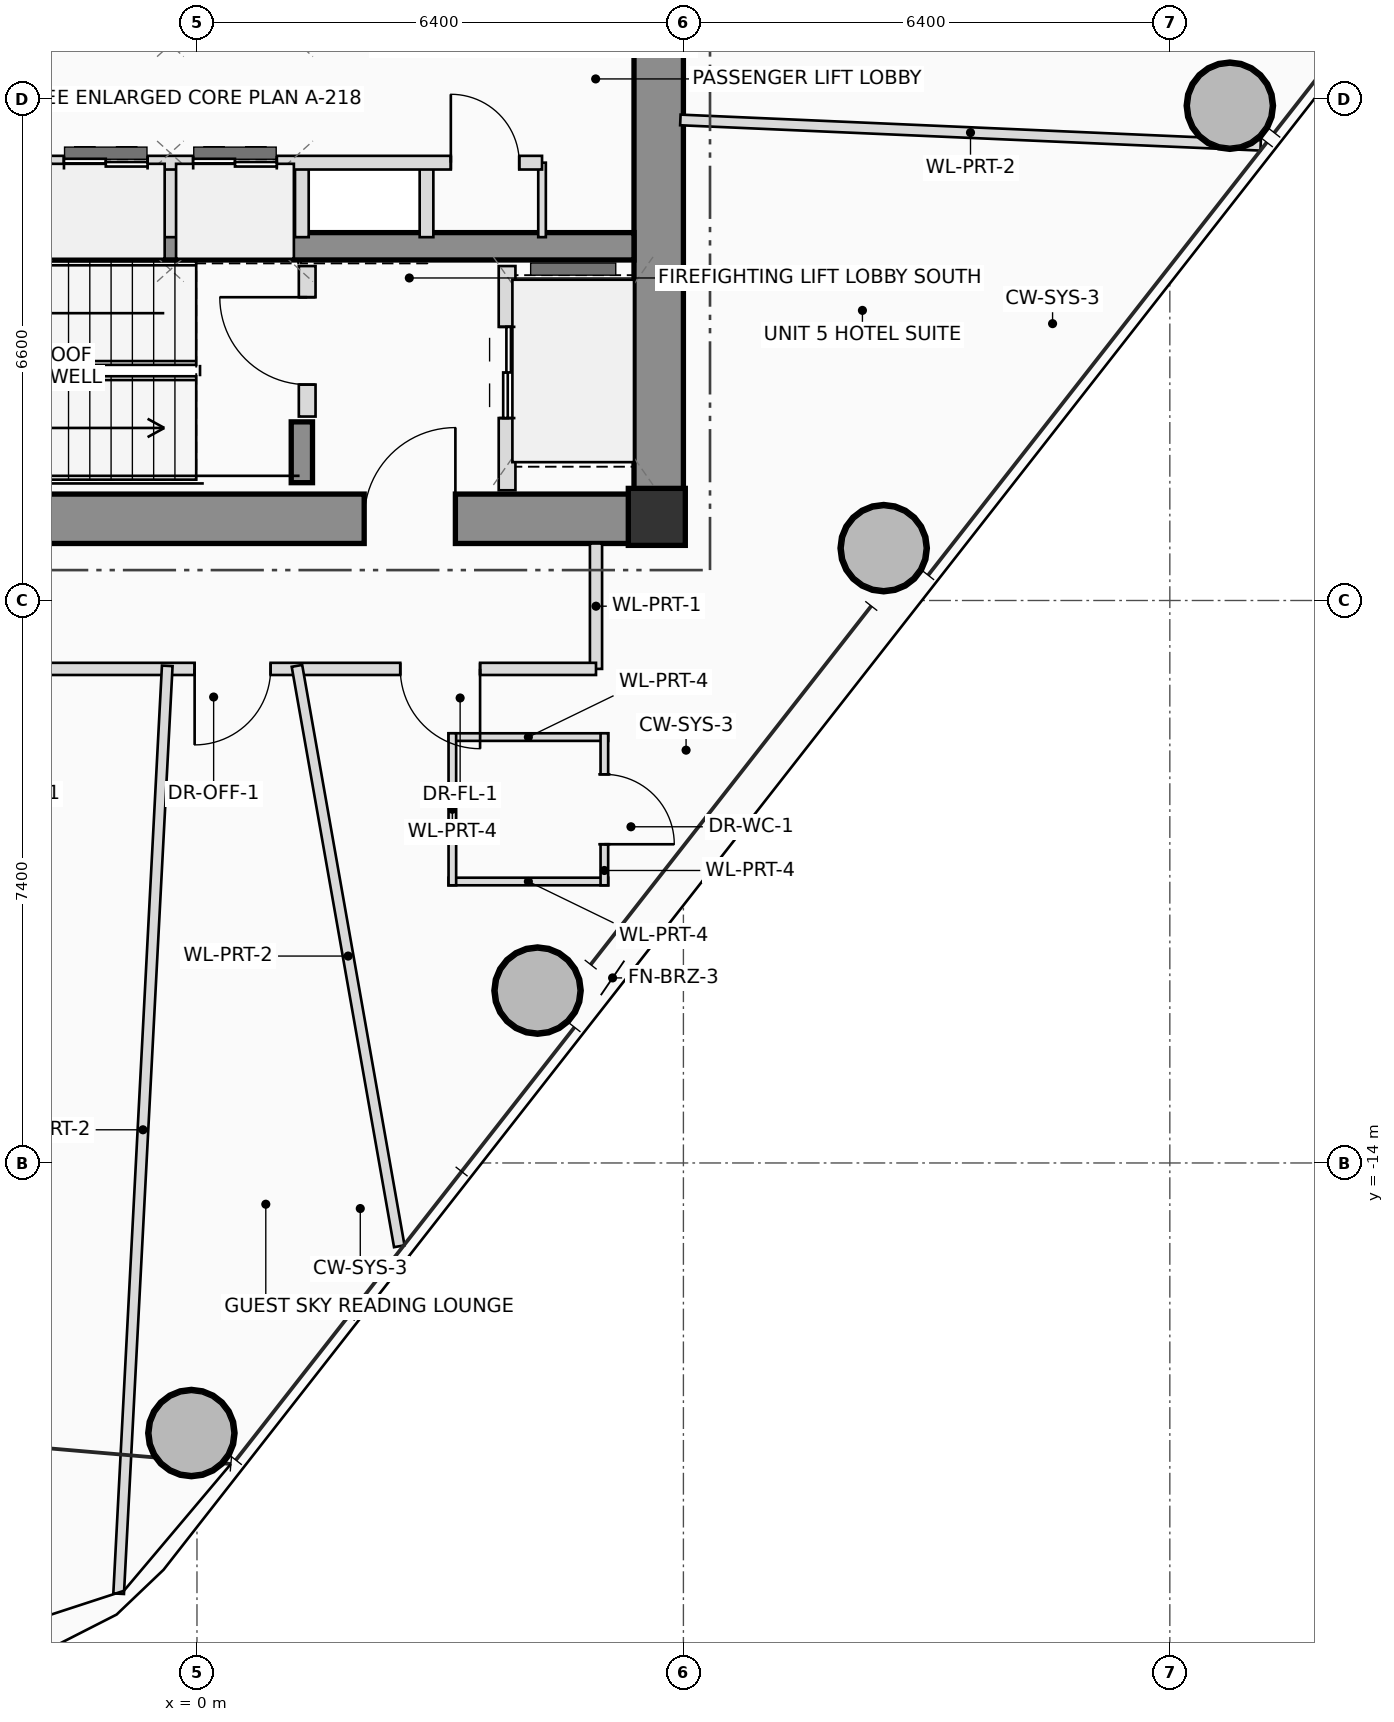
"""IFC4 building model, lengths in metres.
Left out: names, types, materials, properties, quantities, classifications, styles, units other than length and angle.
Written with IfcOpenShell. Run it as: python <this file> out.ifc"""

import sys

from ifc_helpers import new_model, si_unit, direction, frame, frame_2d, origin, origin_2d, place, context, subcontext, project, spatial, rectangle, hollow_circle, extrude, source, transform, mapped, element, fill, save


model = new_model("IFC4")
c1 = context("Model", 3, precision=1e-05, world=origin(), true_north=direction((0.0, 1.0)))
c2 = subcontext(c1, "Body", "Model", "MODEL_VIEW")
j1 = project(units=[si_unit("LENGTHUNIT", "METRE"), si_unit("PLANEANGLEUNIT", "RADIAN")], contexts=[c1])
p1 = place(None, origin())
s1 = spatial("IfcSite", under=j1, at=p1, CompositionType="ELEMENT")
p2 = place(p1, origin())
s2 = spatial("IfcBuilding", under=s1, at=p2, CompositionType="ELEMENT")
p3 = place(p2, frame((0.0, 0.0, 194.9)))
s3 = spatial("IfcBuildingStorey", under=s2, at=p3, CompositionType="ELEMENT", Elevation=194.9)
m1 = source(origin(), c2, "Body", "SweptSolid", [
    extrude(rectangle(XDim=0.75, YDim=0.75, at=origin_2d()), origin(), (0.0, 0.0, 1.0), 3.45),
])
p4 = place(p3, frame((6.05, -5.5, 0.0), z_axis=(0.0, 0.0, 1.0), x_axis=(1.0, 0.0, 0.0)))
e1 = element("IfcColumn", 1, at=p4, inside=s3, PredefinedType="COLUMN", context=c2, shape_type="MappedRepresentation", body=[
    mapped(m1, transform((0.0, 0.0, 0.0), scale=1.0)),
])
p5 = place(p3, frame((-6.4, -5.525, 0.0), z_axis=(0.0, 0.0, 1.0), x_axis=(1.0, 0.0, 0.0)))
e2 = element("IfcWall", 2, at=p5, inside=s3, PredefinedType="SHEAR", context=c2, shape_type="SweptSolid", body=[
    extrude(rectangle(XDim=12.8, YDim=0.65, at=frame_2d((6.4, 0.0))), origin(), (0.0, 0.0, 1.0), 3.45),
])
p6 = place(p5, frame((8.6, 0.0, 0.0)))
e3 = element("IfcOpeningElement", 3, at=p6, cuts=e2, PredefinedType="OPENING", context=c2, shape_type="SweptSolid", body=[
    extrude(rectangle(XDim=1.2, YDim=2.2, at=frame_2d((0.6, 1.1))), frame((0.0, 0.335, 0.0), z_axis=(0.0, -1.0, 0.0), x_axis=(1.0, 0.0, 0.0)), (0.0, 0.0, 1.0), 0.67),
])
p7 = place(p3, frame((6.075, -5.2, 0.0), z_axis=(0.0, 0.0, 1.0), x_axis=(0.0, 1.0, 0.0)))
e4 = element("IfcWall", 4, at=p7, inside=s3, PredefinedType="SHEAR", context=c2, shape_type="SweptSolid", body=[
    extrude(rectangle(XDim=10.4, YDim=0.65, at=frame_2d((5.2, 0.0))), origin(), (0.0, 0.0, 1.0), 3.45),
])
p8 = place(p3, frame((-5.75, -1.94, 0.0), z_axis=(0.0, 0.0, 1.0), x_axis=(1.0, 0.0, 0.0)))
e5 = element("IfcWall", 5, at=p8, inside=s3, PredefinedType="SHEAR", context=c2, shape_type="SweptSolid", body=[
    extrude(rectangle(XDim=11.5, YDim=0.36, at=frame_2d((5.75, 0.0))), origin(), (0.0, 0.0, 1.0), 3.45),
])
p9 = place(p3, frame((1.38, -5.05, 0.0), z_axis=(0.0, 0.0, 1.0), x_axis=(0.0, 1.0, 0.0)))
e6 = element("IfcWall", 6, at=p9, inside=s3, PredefinedType="SHEAR", context=c2, shape_type="SweptSolid", body=[
    extrude(rectangle(XDim=0.8, YDim=0.28, at=frame_2d((0.4, 0.0))), origin(), (0.0, 0.0, 1.0), 3.45),
])
m2 = source(origin(), c2, "Body", "SweptSolid", [
    extrude(hollow_circle(Radius=0.575, WallThickness=0.042, at=origin_2d()), origin(), (0.0, 0.0, 1.0), 3.45),
])
for number, where, z_axis, x_axis in (
    (7, (-0.073, -17.553, 0.0), (0.0, 0.0, 1.0), (1.0, 0.0, 0.0)),
    (8, (4.481, -11.732, 0.0), (0.0, 0.0, 1.0), (1.0, 0.0, 0.0)),
    (9, (9.035, -5.911, 0.0), (0.0, 0.0, 1.0), (1.0, 0.0, 0.0)),
    (10, (13.59, -0.09, 0.0), (0.0, 0.0, 1.0), (1.0, 0.0, 0.0)),
):
    element("IfcColumn", number, at=place(p3, frame(where, z_axis=z_axis, x_axis=x_axis)), inside=s3, PredefinedType="COLUMN", context=c2, shape_type="MappedRepresentation", body=[
        mapped(m2, transform((0.0, 0.0, 0.0), scale=1.0)),
    ])
p10 = place(p3, frame((1.45, -4.18, 0.0), z_axis=(0.0, 0.0, 1.0), x_axis=(0.0, 1.0, 0.0)))
e11 = element("IfcWall", 11, at=p10, inside=s3, PredefinedType="PLUMBINGWALL", context=c2, shape_type="SweptSolid", body=[
    extrude(rectangle(XDim=1.98, YDim=0.22, at=frame_2d((0.99, 0.0))), origin(), (0.0, 0.0, 1.0), 3.25),
])
p11 = place(p10, frame((0.42, 0.0, 0.0)))
e12 = element("IfcOpeningElement", 12, at=p11, cuts=e11, PredefinedType="OPENING", context=c2, shape_type="SweptSolid", body=[
    extrude(rectangle(XDim=1.15, YDim=2.15, at=frame_2d((0.575, 1.075))), frame((0.0, 0.12, 0.0), z_axis=(0.0, -1.0, 0.0), x_axis=(1.0, 0.0, 0.0)), (0.0, 0.0, 1.0), 0.24),
])
p12 = place(p3, frame((4.08, -5.15, 0.0), z_axis=(0.0, 0.0, 1.0), x_axis=(0.0, 1.0, 0.0)))
e13 = element("IfcWall", 13, at=p12, inside=s3, PredefinedType="PLUMBINGWALL", context=c2, shape_type="SweptSolid", body=[
    extrude(rectangle(XDim=2.95, YDim=0.22, at=frame_2d((1.475, 0.0))), origin(), (0.0, 0.0, 1.0), 3.25),
])
p13 = place(p12, frame((0.95, 0.0, 0.0)))
e14 = element("IfcOpeningElement", 14, at=p13, cuts=e13, PredefinedType="OPENING", context=c2, shape_type="SweptSolid", body=[
    extrude(rectangle(XDim=1.2, YDim=2.25, at=frame_2d((0.6, 1.125))), frame((0.0, 0.12, 0.0), z_axis=(0.0, -1.0, 0.0), x_axis=(1.0, 0.0, 0.0)), (0.0, 0.0, 1.0), 0.24),
])
for number, where, z_axis, x_axis in (
    (15, (-0.35, -1.82, 0.0), (0.0, 0.0, 1.0), (0.0, 1.0, 0.0)),
    (16, (1.38, -1.82, 0.0), (0.0, 0.0, 1.0), (0.0, 1.0, 0.0)),
    (17, (3.02, -1.82, 0.0), (0.0, 0.0, 1.0), (0.0, 1.0, 0.0)),
):
    element("IfcWall", number, at=place(p3, frame(where, z_axis=z_axis, x_axis=x_axis)), inside=s3, PredefinedType="PLUMBINGWALL", context=c2, shape_type="SweptSolid", body=[
        extrude(rectangle(XDim=0.98, YDim=0.18, at=frame_2d((0.49, 0.0))), origin(), (0.0, 0.0, 1.0), 3.25),
    ])
p14 = place(p3, frame((4.54, -1.82, 0.0), z_axis=(0.0, 0.0, 1.0), x_axis=(0.0, 1.0, 0.0)))
e18 = element("IfcWall", 18, at=p14, inside=s3, PredefinedType="PARTITIONING", context=c2, shape_type="SweptSolid", body=[
    extrude(rectangle(XDim=0.98, YDim=0.1, at=frame_2d((0.49, 0.0))), origin(), (0.0, 0.0, 1.0), 3.25),
])
p15 = place(p3, frame((-5.68, -0.84, 0.0), z_axis=(0.0, 0.0, 1.0), x_axis=(1.0, 0.0, 0.0)))
e19 = element("IfcWall", 19, at=p15, inside=s3, PredefinedType="PLUMBINGWALL", context=c2, shape_type="SweptSolid", body=[
    extrude(rectangle(XDim=10.22, YDim=0.18, at=frame_2d((5.11, 0.0))), origin(), (0.0, 0.0, 1.0), 3.25),
])
p16 = place(p15, frame((1.38, 0.0, 0.0)))
e20 = element("IfcOpeningElement", 20, at=p16, cuts=e19, PredefinedType="OPENING", context=c2, shape_type="SweptSolid", body=[
    extrude(rectangle(XDim=0.9, YDim=2.05, at=frame_2d((0.45, 1.025))), frame((0.0, 0.1, 0.0), z_axis=(0.0, -1.0, 0.0), x_axis=(1.0, 0.0, 0.0)), (0.0, 0.0, 1.0), 0.2),
])
p17 = place(p15, frame((3.93, 0.0, 0.0)))
e21 = element("IfcOpeningElement", 21, at=p17, cuts=e19, PredefinedType="OPENING", context=c2, shape_type="SweptSolid", body=[
    extrude(rectangle(XDim=1.1, YDim=2.2, at=frame_2d((0.55, 1.1))), frame((0.0, 0.1, 0.0), z_axis=(0.0, -1.0, 0.0), x_axis=(1.0, 0.0, 0.0)), (0.0, 0.0, 1.0), 0.2),
])
p18 = place(p15, frame((5.63, 0.0, 0.0)))
e22 = element("IfcOpeningElement", 22, at=p18, cuts=e19, PredefinedType="OPENING", context=c2, shape_type="SweptSolid", body=[
    extrude(rectangle(XDim=1.1, YDim=2.2, at=frame_2d((0.55, 1.1))), frame((0.0, 0.1, 0.0), z_axis=(0.0, -1.0, 0.0), x_axis=(1.0, 0.0, 0.0)), (0.0, 0.0, 1.0), 0.2),
])
p19 = place(p15, frame((9.02, 0.0, 0.0)))
e23 = element("IfcOpeningElement", 23, at=p19, cuts=e19, PredefinedType="OPENING", context=c2, shape_type="SweptSolid", body=[
    extrude(rectangle(XDim=0.9, YDim=2.05, at=frame_2d((0.45, 1.025))), frame((0.0, 0.1, 0.0), z_axis=(0.0, -1.0, 0.0), x_axis=(1.0, 0.0, 0.0)), (0.0, 0.0, 1.0), 0.2),
])
for number, where, z_axis, x_axis in (
    (24, (3.31, -8.397, 0.0), (0.0, 0.0, 1.0), (1.0, 0.0, 0.0)),
    (25, (5.41, -10.297, 0.0), (0.0, 0.0, 1.0), (-1.0, 0.0, 0.0)),
):
    element("IfcWall", number, at=place(p3, frame(where, z_axis=z_axis, x_axis=x_axis)), inside=s3, PredefinedType="PARTITIONING", context=c2, shape_type="SweptSolid", body=[
        extrude(rectangle(XDim=2.1, YDim=0.1, at=frame_2d((1.05, 0.0))), origin(), (0.0, 0.0, 1.0), 2.605),
    ])
p20 = place(p3, frame((5.36, -8.347, 0.0), z_axis=(0.0, 0.0, 1.0), x_axis=(0.0, -1.0, 0.0)))
e26 = element("IfcWall", 26, at=p20, inside=s3, PredefinedType="PARTITIONING", context=c2, shape_type="SweptSolid", body=[
    extrude(rectangle(XDim=2.0, YDim=0.1, at=frame_2d((1.0, 0.0))), origin(), (0.0, 0.0, 1.0), 2.605),
])
p21 = place(p20, frame((0.54, 0.0, 0.0)))
e27 = element("IfcOpeningElement", 27, at=p21, cuts=e26, PredefinedType="OPENING", context=c2, shape_type="SweptSolid", body=[
    extrude(rectangle(XDim=0.92, YDim=2.1, at=frame_2d((0.46, 1.05))), frame((0.0, 0.06, 0.0), z_axis=(0.0, -1.0, 0.0), x_axis=(1.0, 0.0, 0.0)), (0.0, 0.0, 1.0), 0.12),
])
p22 = place(p3, frame((3.36, -10.347, 0.0), z_axis=(0.0, 0.0, 1.0), x_axis=(0.0, 1.0, 0.0)))
e28 = element("IfcWall", 28, at=p22, inside=s3, PredefinedType="PARTITIONING", context=c2, shape_type="SweptSolid", body=[
    extrude(rectangle(XDim=2.0, YDim=0.1, at=frame_2d((1.0, 0.0))), origin(), (0.0, 0.0, 1.0), 2.805),
])
p23 = place(p3, frame((5.25, -5.85, 0.0), z_axis=(0.0, 0.0, 1.0), x_axis=(0.0, -1.0, 0.0)))
e29 = element("IfcWall", 29, at=p23, inside=s3, PredefinedType="PARTITIONING", context=c2, shape_type="SweptSolid", body=[
    extrude(rectangle(XDim=1.65, YDim=0.16, at=frame_2d((0.825, 0.0))), origin(), (0.0, 0.0, 1.0), 3.25),
])
p24 = place(p3, frame((5.25, -7.5, 0.0), z_axis=(0.0, 0.0, 1.0), x_axis=(-1.0, 0.0, 0.0)))
e30 = element("IfcWall", 30, at=p24, inside=s3, PredefinedType="PARTITIONING", context=c2, shape_type="SweptSolid", body=[
    extrude(rectangle(XDim=11.61, YDim=0.16, at=frame_2d((5.805, 0.0))), origin(), (0.0, 0.0, 1.0), 2.605),
])
p25 = place(p24, frame((1.525, 0.0, 0.0)))
e31 = element("IfcOpeningElement", 31, at=p25, cuts=e30, PredefinedType="OPENING", context=c2, shape_type="SweptSolid", body=[
    extrude(rectangle(XDim=1.05, YDim=2.2, at=frame_2d((0.525, 1.1))), frame((0.0, 0.09, 0.0), z_axis=(0.0, -1.0, 0.0), x_axis=(1.0, 0.0, 0.0)), (0.0, 0.0, 1.0), 0.18),
])
p26 = place(p24, frame((4.281, 0.0, 0.0)))
e32 = element("IfcOpeningElement", 32, at=p26, cuts=e30, PredefinedType="OPENING", context=c2, shape_type="SweptSolid", body=[
    extrude(rectangle(XDim=1.0, YDim=2.25, at=frame_2d((0.5, 1.125))), frame((0.0, 0.09, 0.0), z_axis=(0.0, -1.0, 0.0), x_axis=(1.0, 0.0, 0.0)), (0.0, 0.0, 1.0), 0.18),
])
p27 = place(p24, frame((7.409, 0.0, 0.0)))
e33 = element("IfcOpeningElement", 33, at=p27, cuts=e30, PredefinedType="OPENING", context=c2, shape_type="SweptSolid", body=[
    extrude(rectangle(XDim=1.0, YDim=2.25, at=frame_2d((0.5, 1.125))), frame((0.0, 0.09, 0.0), z_axis=(0.0, -1.0, 0.0), x_axis=(1.0, 0.0, 0.0)), (0.0, 0.0, 1.0), 0.18),
])
p28 = place(p3, frame((6.36, -0.278, 0.0), z_axis=(0.0, 0.0, 1.0), x_axis=(0.999047276506, -0.04364102778, 0.0)))
e34 = element("IfcWall", 34, at=p28, inside=s3, PredefinedType="PARTITIONING", context=c2, shape_type="SweptSolid", body=[
    extrude(rectangle(XDim=7.642, YDim=0.14, at=frame_2d((3.821, 0.0))), origin(), (0.0, 0.0, 1.0), 2.605),
])
p29 = place(p3, frame((-0.391, -7.46, 0.0), z_axis=(0.0, 0.0, 1.0), x_axis=(-0.052329252614, -0.998629886054, 0.0)))
e35 = element("IfcWall", 35, at=p29, inside=s3, PredefinedType="PARTITIONING", context=c2, shape_type="SweptSolid", body=[
    extrude(rectangle(XDim=12.224, YDim=0.14, at=frame_2d((6.112, 0.0))), origin(), (0.0, 0.0, 1.0), 2.605),
])
p30 = place(p3, frame((1.315, -7.46, 0.0), z_axis=(0.0, 0.0, 1.0), x_axis=(0.173654204409, -0.984806690316, 0.0)))
e36 = element("IfcWall", 36, at=p30, inside=s3, PredefinedType="PARTITIONING", context=c2, shape_type="SweptSolid", body=[
    extrude(rectangle(XDim=7.754, YDim=0.14, at=frame_2d((3.877, 0.0))), origin(), (0.0, 0.0, 1.0), 2.765),
])
p31 = place(p6, origin())
e37 = element("IfcDoor", 37, at=p31, inside=s3, OperationType="SINGLE_SWING_RIGHT", PredefinedType="DOOR", context=c2, shape_type="SweptSolid", body=[
    extrude(rectangle(XDim=1.2, YDim=2.2, at=frame_2d((0.6, 1.1))), frame((0.0, 0.025, 0.0), z_axis=(0.0, -1.0, 0.0), x_axis=(1.0, 0.0, 0.0)), (0.0, 0.0, 1.0), 0.05),
])
fill(e3, e37)
p32 = place(p11, origin())
e38 = element("IfcDoor", 38, at=p32, inside=s3, OperationType="SINGLE_SWING_RIGHT", PredefinedType="DOOR", context=c2, shape_type="SweptSolid", body=[
    extrude(rectangle(XDim=1.15, YDim=2.15, at=frame_2d((0.575, 1.075))), frame((0.0, 0.025, 0.0), z_axis=(0.0, -1.0, 0.0), x_axis=(1.0, 0.0, 0.0)), (0.0, 0.0, 1.0), 0.05),
])
fill(e12, e38)
p33 = place(p13, origin())
e39 = element("IfcDoor", 39, at=p33, inside=s3, OperationType="DOUBLE_DOOR_SLIDING", PredefinedType="DOOR", context=c2, shape_type="SweptSolid", body=[
    extrude(rectangle(XDim=1.2, YDim=2.25, at=frame_2d((0.6, 1.125))), frame((0.0, 0.025, 0.0), z_axis=(0.0, -1.0, 0.0), x_axis=(1.0, 0.0, 0.0)), (0.0, 0.0, 1.0), 0.05),
])
fill(e14, e39)
p34 = place(p17, origin())
e40 = element("IfcDoor", 40, at=p34, inside=s3, OperationType="DOUBLE_DOOR_SLIDING", PredefinedType="DOOR", context=c2, shape_type="SweptSolid", body=[
    extrude(rectangle(XDim=1.1, YDim=2.2, at=frame_2d((0.55, 1.1))), frame((0.0, 0.025, 0.0), z_axis=(0.0, -1.0, 0.0), x_axis=(1.0, 0.0, 0.0)), (0.0, 0.0, 1.0), 0.05),
])
fill(e21, e40)
p35 = place(p18, origin())
e41 = element("IfcDoor", 41, at=p35, inside=s3, OperationType="DOUBLE_DOOR_SLIDING", PredefinedType="DOOR", context=c2, shape_type="SweptSolid", body=[
    extrude(rectangle(XDim=1.1, YDim=2.2, at=frame_2d((0.55, 1.1))), frame((0.0, 0.025, 0.0), z_axis=(0.0, -1.0, 0.0), x_axis=(1.0, 0.0, 0.0)), (0.0, 0.0, 1.0), 0.05),
])
fill(e22, e41)
p36 = place(p19, origin())
e42 = element("IfcDoor", 42, at=p36, inside=s3, OperationType="SINGLE_SWING_LEFT", PredefinedType="DOOR", context=c2, shape_type="SweptSolid", body=[
    extrude(rectangle(XDim=0.9, YDim=2.05, at=frame_2d((0.45, 1.025))), frame((0.0, 0.025, 0.0), z_axis=(0.0, -1.0, 0.0), x_axis=(1.0, 0.0, 0.0)), (0.0, 0.0, 1.0), 0.05),
])
fill(e23, e42)
p37 = place(p21, origin())
e43 = element("IfcDoor", 43, at=p37, inside=s3, OperationType="SINGLE_SWING_RIGHT", PredefinedType="DOOR", context=c2, shape_type="SweptSolid", body=[
    extrude(rectangle(XDim=0.92, YDim=2.1, at=frame_2d((0.46, 1.05))), frame((0.0, 0.025, 0.0), z_axis=(0.0, -1.0, 0.0), x_axis=(1.0, 0.0, 0.0)), (0.0, 0.0, 1.0), 0.05),
])
fill(e27, e43)
p38 = place(p25, origin())
e44 = element("IfcDoor", 44, at=p38, inside=s3, OperationType="SINGLE_SWING_LEFT", PredefinedType="DOOR", context=c2, shape_type="SweptSolid", body=[
    extrude(rectangle(XDim=1.05, YDim=2.2, at=frame_2d((0.525, 1.1))), frame((0.0, 0.025, 0.0), z_axis=(0.0, -1.0, 0.0), x_axis=(1.0, 0.0, 0.0)), (0.0, 0.0, 1.0), 0.05),
])
fill(e31, e44)
p39 = place(p26, origin())
e45 = element("IfcDoor", 45, at=p39, inside=s3, OperationType="SINGLE_SWING_RIGHT", PredefinedType="DOOR", context=c2, shape_type="SweptSolid", body=[
    extrude(rectangle(XDim=1.0, YDim=2.25, at=frame_2d((0.5, 1.125))), frame((0.0, 0.025, 0.0), z_axis=(0.0, -1.0, 0.0), x_axis=(1.0, 0.0, 0.0)), (0.0, 0.0, 1.0), 0.05),
])
fill(e32, e45)
save(model, sys.argv[1])
